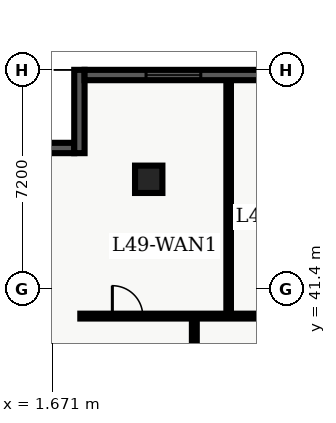
"""IFC4 building model, lengths in metres.
Left out: names, types, materials, properties, quantities, classifications, styles, units other than length and angle.
Written with IfcOpenShell. Run it as: python <this file> out.ifc"""

import sys

from ifc_helpers import new_model, entity, si_unit, converted_unit, direction, frame, origin_with_axes, origin_2d_with_axis, place, context, subcontext, project, spatial, polyline, rectangle, outline, extrude, element, fill, save


model = new_model("IFC4")
c1 = context("Model", 3, precision=1e-05, world=origin_with_axes(), true_north=direction((0.0, 1.0)))
c2 = subcontext(c1, "Body", "Model", "MODEL_VIEW")
j1 = project(units=[si_unit("LENGTHUNIT", "METRE"), converted_unit("PLANEANGLEUNIT", "DEGREE", entity("IfcPlaneAngleMeasure", 0.017), si_unit("PLANEANGLEUNIT", "RADIAN"), dimensions=[0, 0, 0, 0, 0, 0, 0])], contexts=[c1])
p1 = place(None, origin_with_axes())
s1 = spatial("IfcSite", under=j1, at=p1, CompositionType="ELEMENT")
p2 = place(p1, origin_with_axes())
s2 = spatial("IfcBuilding", under=s1, at=p2, CompositionType="ELEMENT")
p3 = place(p2, frame((0.0, 0.0, 200.4), z_axis=(0.0, 0.0, 1.0), x_axis=(1.0, 0.0, 0.0)))
s3 = spatial("IfcBuildingStorey", under=s2, at=p3, CompositionType="ELEMENT", Elevation=200.4)
p4 = place(p3, frame((4.85, 45.0, 0.0), z_axis=(0.0, 0.0, 1.0), x_axis=(1.0, 0.0, 0.0)))
e1 = element("IfcColumn", 1, at=p4, inside=s3, PredefinedType="COLUMN", context=c2, shape_type="SweptSolid", body=[
    extrude(rectangle(XDim=0.9, YDim=0.9, at=origin_2d_with_axis()), origin_with_axes(), (0.0, 0.0, 1.0), 3.9),
])
p5 = place(p3, frame((2.6, 40.5, 0.0), z_axis=(0.0, 0.0, 1.0), x_axis=(1.0, 0.0, 0.0)))
e2 = element("IfcWall", 2, at=p5, inside=s3, PredefinedType="PARTITIONING", context=c2, shape_type="SweptSolid", body=[
    extrude(outline(polyline([(0.0, -0.08), (26.177, -0.08), (26.177, 0.08), (0.0, 0.08), (0.0, -0.08)])), origin_with_axes(), (0.0, 0.0, 1.0), 2.7),
])
p6 = place(p5, frame((1.554, 0.0, 0.0), z_axis=(0.0, 0.0, 1.0), x_axis=(1.0, 0.0, 0.0)))
e3 = element("IfcOpeningElement", 3, at=p6, cuts=e2, PredefinedType="OPENING", context=c2, shape_type="SweptSolid", body=[
    extrude(rectangle(XDim=1.0, YDim=0.18, at=origin_2d_with_axis()), origin_with_axes(), (0.0, 0.0, 1.0), 2.15),
])
p7 = place(p5, frame((6.84, 0.0, 0.0), z_axis=(0.0, 0.0, 1.0), x_axis=(1.0, 0.0, 0.0)))
e4 = element("IfcOpeningElement", 4, at=p7, cuts=e2, PredefinedType="OPENING", context=c2, shape_type="SweptSolid", body=[
    extrude(rectangle(XDim=1.0, YDim=0.18, at=origin_2d_with_axis()), origin_with_axes(), (0.0, 0.0, 1.0), 2.15),
])
p8 = place(p5, frame((10.996, 0.0, 0.0), z_axis=(0.0, 0.0, 1.0), x_axis=(1.0, 0.0, 0.0)))
e5 = element("IfcOpeningElement", 5, at=p8, cuts=e2, PredefinedType="OPENING", context=c2, shape_type="SweptSolid", body=[
    extrude(rectangle(XDim=1.0, YDim=0.18, at=origin_2d_with_axis()), origin_with_axes(), (0.0, 0.0, 1.0), 2.15),
])
p9 = place(p5, frame((15.636, 0.0, 0.0), z_axis=(0.0, 0.0, 1.0), x_axis=(1.0, 0.0, 0.0)))
e6 = element("IfcOpeningElement", 6, at=p9, cuts=e2, PredefinedType="OPENING", context=c2, shape_type="SweptSolid", body=[
    extrude(rectangle(XDim=1.0, YDim=0.18, at=origin_2d_with_axis()), origin_with_axes(), (0.0, 0.0, 1.0), 2.15),
])
p10 = place(p3, frame((6.35, 7.8, 0.0), z_axis=(0.0, 0.0, 1.0), x_axis=(0.0, 1.0, 0.0)))
e7 = element("IfcWall", 7, at=p10, inside=s3, PredefinedType="PARTITIONING", context=c2, shape_type="SweptSolid", body=[
    extrude(outline(polyline([(0.0, -0.08), (32.7, -0.08), (32.7, 0.08), (0.0, 0.08), (0.0, -0.08)])), origin_with_axes(), (0.0, 0.0, 1.0), 2.7),
])
p11 = place(p10, frame((4.415, 0.0, 0.0), z_axis=(0.0, 0.0, 1.0), x_axis=(1.0, 0.0, 0.0)))
e8 = element("IfcOpeningElement", 8, at=p11, cuts=e7, PredefinedType="OPENING", context=c2, shape_type="SweptSolid", body=[
    extrude(rectangle(XDim=1.0, YDim=0.18, at=origin_2d_with_axis()), origin_with_axes(), (0.0, 0.0, 1.0), 2.15),
])
p12 = place(p10, frame((9.986, 0.0, 0.0), z_axis=(0.0, 0.0, 1.0), x_axis=(1.0, 0.0, 0.0)))
e9 = element("IfcOpeningElement", 9, at=p12, cuts=e7, PredefinedType="OPENING", context=c2, shape_type="SweptSolid", body=[
    extrude(rectangle(XDim=1.0, YDim=0.18, at=origin_2d_with_axis()), origin_with_axes(), (0.0, 0.0, 1.0), 2.15),
])
p13 = place(p10, frame((18.332, 0.0, 0.0), z_axis=(0.0, 0.0, 1.0), x_axis=(1.0, 0.0, 0.0)))
e10 = element("IfcOpeningElement", 10, at=p13, cuts=e7, PredefinedType="OPENING", context=c2, shape_type="SweptSolid", body=[
    extrude(rectangle(XDim=1.0, YDim=0.18, at=origin_2d_with_axis()), origin_with_axes(), (0.0, 0.0, 1.0), 2.15),
])
p14 = place(p10, frame((25.088, 0.0, 0.0), z_axis=(0.0, 0.0, 1.0), x_axis=(1.0, 0.0, 0.0)))
e11 = element("IfcOpeningElement", 11, at=p14, cuts=e7, PredefinedType="OPENING", context=c2, shape_type="SweptSolid", body=[
    extrude(rectangle(XDim=1.0, YDim=0.18, at=origin_2d_with_axis()), origin_with_axes(), (0.0, 0.0, 1.0), 2.15),
])
p15 = place(p10, frame((31.177, 0.0, 0.0), z_axis=(0.0, 0.0, 1.0), x_axis=(1.0, 0.0, 0.0)))
e12 = element("IfcOpeningElement", 12, at=p15, cuts=e7, PredefinedType="OPENING", context=c2, shape_type="SweptSolid", body=[
    extrude(rectangle(XDim=1.0, YDim=0.18, at=origin_2d_with_axis()), origin_with_axes(), (0.0, 0.0, 1.0), 2.15),
])
p16 = place(p3, frame((7.479, 40.6, 0.0), z_axis=(0.0, 0.0, 1.0), x_axis=(0.0, 1.0, 0.0)))
e13 = element("IfcWall", 13, at=p16, inside=s3, PredefinedType="PARTITIONING", context=c2, shape_type="SweptSolid", body=[
    extrude(outline(polyline([(0.0, -0.075), (7.665, -0.075), (7.665, 0.075), (0.0, 0.075), (0.0, -0.075)])), origin_with_axes(), (0.0, 0.0, 1.0), 2.7),
])
p17 = place(p3, frame((0.34, 46.03, 0.0), z_axis=(0.0, 0.0, 1.0), x_axis=(1.0, 0.0, 0.0)))
e14 = element("IfcWall", 14, at=p17, inside=s3, PredefinedType="SOLIDWALL", context=c2, shape_type="SweptSolid", body=[
    extrude(outline(polyline([(0.0, -0.17), (2.06, -0.17), (2.06, 0.17), (0.0, 0.17), (0.0, -0.17)])), origin_with_axes(), (0.0, 0.0, 1.0), 3.66),
])
p18 = place(p3, frame((2.57, 45.86, 0.0), z_axis=(0.0, 0.0, 1.0), x_axis=(0.0, 1.0, 0.0)))
e15 = element("IfcWall", 15, at=p18, inside=s3, PredefinedType="SOLIDWALL", context=c2, shape_type="SweptSolid", body=[
    extrude(outline(polyline([(0.0, -0.17), (2.74, -0.17), (2.74, 0.17), (0.0, 0.17), (0.0, -0.17)])), origin_with_axes(), (0.0, 0.0, 1.0), 3.66),
])
p19 = place(p3, frame((2.74, 48.43, 0.0), z_axis=(0.0, 0.0, 1.0), x_axis=(1.0, 0.0, 0.0)))
e16 = element("IfcWall", 16, at=p19, inside=s3, PredefinedType="SOLIDWALL", context=c2, shape_type="SweptSolid", body=[
    extrude(outline(polyline([(0.0, -0.17), (19.772, -0.17), (19.772, 0.17), (0.0, 0.17), (0.0, -0.17)])), origin_with_axes(), (0.0, 0.0, 1.0), 3.66),
])
p20 = place(p19, frame((2.922, 0.0, 0.45), z_axis=(0.0, 0.0, 1.0), x_axis=(1.0, 0.0, 0.0)))
e17 = element("IfcOpeningElement", 17, at=p20, cuts=e16, PredefinedType="OPENING", context=c2, shape_type="SweptSolid", body=[
    extrude(rectangle(XDim=1.8, YDim=0.36, at=origin_2d_with_axis()), origin_with_axes(), (0.0, 0.0, 1.0), 2.1),
])
p21 = place(p19, frame((7.114, 0.0, 0.45), z_axis=(0.0, 0.0, 1.0), x_axis=(1.0, 0.0, 0.0)))
e18 = element("IfcOpeningElement", 18, at=p21, cuts=e16, PredefinedType="OPENING", context=c2, shape_type="SweptSolid", body=[
    extrude(rectangle(XDim=1.8, YDim=0.36, at=origin_2d_with_axis()), origin_with_axes(), (0.0, 0.0, 1.0), 2.1),
])
p22 = place(p19, frame((12.207, 0.0, 0.45), z_axis=(0.0, 0.0, 1.0), x_axis=(1.0, 0.0, 0.0)))
e19 = element("IfcOpeningElement", 19, at=p22, cuts=e16, PredefinedType="OPENING", context=c2, shape_type="SweptSolid", body=[
    extrude(rectangle(XDim=1.8, YDim=0.36, at=origin_2d_with_axis()), origin_with_axes(), (0.0, 0.0, 1.0), 2.1),
])
p23 = place(p19, frame((16.85, 0.0, 0.45), z_axis=(0.0, 0.0, 1.0), x_axis=(1.0, 0.0, 0.0)))
e20 = element("IfcOpeningElement", 20, at=p23, cuts=e16, PredefinedType="OPENING", context=c2, shape_type="SweptSolid", body=[
    extrude(rectangle(XDim=1.8, YDim=0.36, at=origin_2d_with_axis()), origin_with_axes(), (0.0, 0.0, 1.0), 2.1),
])
p24 = place(p5, frame((1.554, 0.0, 0.0), z_axis=(0.0, 0.0, 1.0), x_axis=(1.0, 0.0, 0.0)))
e21 = element("IfcDoor", 21, at=p24, inside=s3, OperationType="SINGLE_SWING_LEFT", PredefinedType="DOOR", context=c2, shape_type="SweptSolid", body=[
    extrude(rectangle(XDim=1.0, YDim=0.09, at=origin_2d_with_axis()), origin_with_axes(), (0.0, 0.0, 1.0), 2.15),
])
fill(e3, e21)
p25 = place(p19, frame((2.922, 0.0, 0.45), z_axis=(0.0, 0.0, 1.0), x_axis=(1.0, 0.0, 0.0)))
e22 = element("IfcWindow", 22, at=p25, inside=s3, PredefinedType="WINDOW", context=c2, shape_type="SweptSolid", body=[
    extrude(rectangle(XDim=1.8, YDim=0.09, at=origin_2d_with_axis()), origin_with_axes(), (0.0, 0.0, 1.0), 2.1),
])
fill(e17, e22)
save(model, sys.argv[1])
